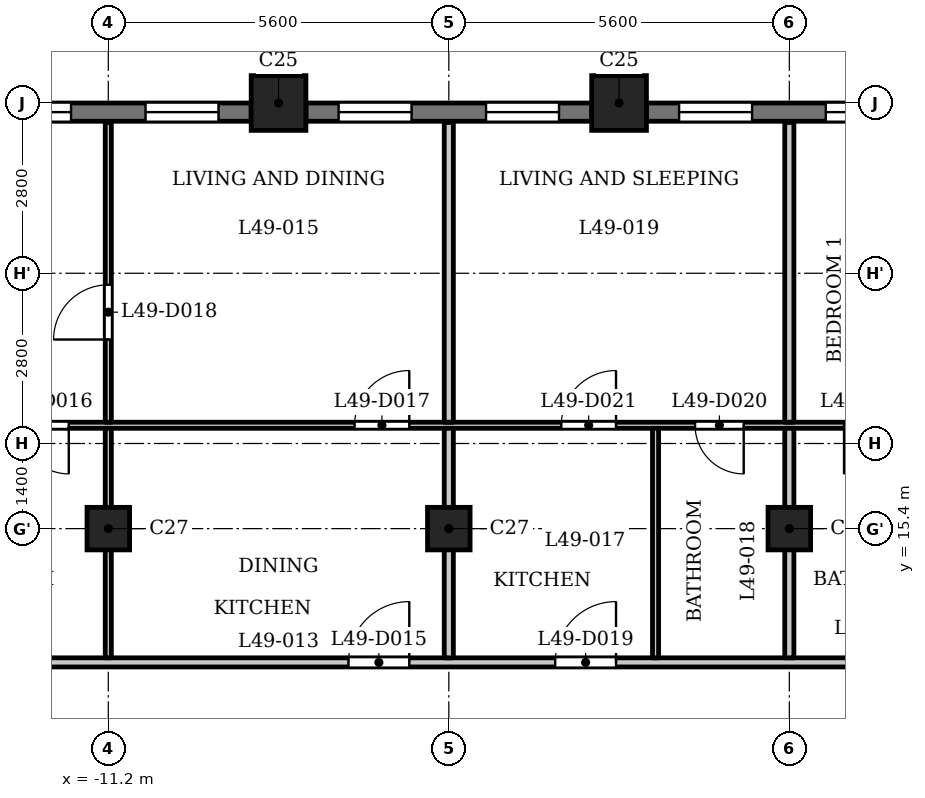
"""IFC4 building model, lengths in metres.
Left out: names, types, materials, properties, quantities, classifications, styles, units other than length and angle.
Written with IfcOpenShell. Run it as: python <this file> out.ifc"""

import sys

from ifc_helpers import new_model, si_unit, direction, frame, frame_2d, origin, origin_2d, place, context, subcontext, project, spatial, rectangle, extrude, element, fill, save


model = new_model("IFC4")
c1 = context("Model", 3, precision=1e-05, world=origin(), true_north=direction((0.0, 1.0)))
c2 = subcontext(c1, "Body", "Model", "MODEL_VIEW")
j1 = project(units=[si_unit("LENGTHUNIT", "METRE"), si_unit("PLANEANGLEUNIT", "RADIAN")], contexts=[c1])
p1 = place(None, origin())
s1 = spatial("IfcSite", under=j1, at=p1, CompositionType="ELEMENT")
p2 = place(p1, origin())
s2 = spatial("IfcBuilding", under=s1, at=p2, CompositionType="ELEMENT")
p3 = place(p2, frame((0.0, 0.0, 192.4)))
s3 = spatial("IfcBuildingStorey", under=s2, at=p3, CompositionType="ELEMENT", Elevation=192.4)
for number, where, z_axis, x_axis in (
    (1, (-2.8, 22.4, 0.0), (0.0, 0.0, 1.0), (1.0, 0.0, 0.0)),
    (2, (-8.4, 22.4, 0.0), (0.0, 0.0, 1.0), (1.0, 0.0, 0.0)),
):
    element("IfcColumn", number, at=place(p3, frame(where, z_axis=z_axis, x_axis=x_axis)), inside=s3, PredefinedType="COLUMN", context=c2, shape_type="SweptSolid", body=[
        extrude(rectangle(XDim=0.9, YDim=0.9, at=origin_2d()), origin(), (0.0, 0.0, 1.0), 3.5),
    ])
for number, where, z_axis, x_axis in (
    (3, (-11.2, 15.4, 0.0), (0.0, 0.0, 1.0), (1.0, 0.0, 0.0)),
    (4, (-5.6, 15.4, 0.0), (0.0, 0.0, 1.0), (1.0, 0.0, 0.0)),
    (5, (0.0, 15.4, 0.0), (0.0, 0.0, 1.0), (1.0, 0.0, 0.0)),
):
    element("IfcColumn", number, at=place(p3, frame(where, z_axis=z_axis, x_axis=x_axis)), inside=s3, PredefinedType="COLUMN", context=c2, shape_type="SweptSolid", body=[
        extrude(rectangle(XDim=0.7, YDim=0.7, at=origin_2d()), origin(), (0.0, 0.0, 1.0), 3.5),
    ])
p4 = place(p3, frame((2.35, 22.25, 0.0), z_axis=(0.0, 0.0, 1.0), x_axis=(-1.0, 0.0, 0.0)))
e6 = element("IfcWall", 6, at=p4, inside=s3, PredefinedType="SOLIDWALL", context=c2, shape_type="SweptSolid", body=[
    extrude(rectangle(XDim=4.7, YDim=0.3, at=frame_2d((2.35, 0.0))), origin(), (0.0, 0.0, 1.0), 2.5),
])
p5 = place(p4, frame((0.55, 0.0, 0.6)))
e7 = element("IfcOpeningElement", 7, at=p5, cuts=e6, PredefinedType="OPENING", context=c2, shape_type="SweptSolid", body=[
    extrude(rectangle(XDim=1.2, YDim=1.55, at=frame_2d((0.6, 0.775))), frame((0.0, 0.16, 0.0), z_axis=(0.0, -1.0, 0.0), x_axis=(1.0, 0.0, 0.0)), (0.0, 0.0, 1.0), 0.32),
])
p6 = place(p4, frame((2.962, 0.0, 0.6)))
e8 = element("IfcOpeningElement", 8, at=p6, cuts=e6, PredefinedType="OPENING", context=c2, shape_type="SweptSolid", body=[
    extrude(rectangle(XDim=1.2, YDim=1.55, at=frame_2d((0.6, 0.775))), frame((0.0, 0.16, 0.0), z_axis=(0.0, -1.0, 0.0), x_axis=(1.0, 0.0, 0.0)), (0.0, 0.0, 1.0), 0.32),
])
p7 = place(p3, frame((-3.25, 22.25, 0.0), z_axis=(0.0, 0.0, 1.0), x_axis=(-1.0, 0.0, 0.0)))
e9 = element("IfcWall", 9, at=p7, inside=s3, PredefinedType="SOLIDWALL", context=c2, shape_type="SweptSolid", body=[
    extrude(rectangle(XDim=4.7, YDim=0.3, at=frame_2d((2.35, 0.0))), origin(), (0.0, 0.0, 1.0), 2.5),
])
p8 = place(p7, frame((0.538, 0.0, 0.6)))
e10 = element("IfcOpeningElement", 10, at=p8, cuts=e9, PredefinedType="OPENING", context=c2, shape_type="SweptSolid", body=[
    extrude(rectangle(XDim=1.2, YDim=1.55, at=frame_2d((0.6, 0.775))), frame((0.0, 0.16, 0.0), z_axis=(0.0, -1.0, 0.0), x_axis=(1.0, 0.0, 0.0)), (0.0, 0.0, 1.0), 0.32),
])
p9 = place(p7, frame((2.962, 0.0, 0.6)))
e11 = element("IfcOpeningElement", 11, at=p9, cuts=e9, PredefinedType="OPENING", context=c2, shape_type="SweptSolid", body=[
    extrude(rectangle(XDim=1.2, YDim=1.55, at=frame_2d((0.6, 0.775))), frame((0.0, 0.16, 0.0), z_axis=(0.0, -1.0, 0.0), x_axis=(1.0, 0.0, 0.0)), (0.0, 0.0, 1.0), 0.32),
])
p10 = place(p3, frame((-8.85, 22.25, 0.0), z_axis=(0.0, 0.0, 1.0), x_axis=(-1.0, 0.0, 0.0)))
e12 = element("IfcWall", 12, at=p10, inside=s3, PredefinedType="SOLIDWALL", context=c2, shape_type="SweptSolid", body=[
    extrude(rectangle(XDim=4.7, YDim=0.3, at=frame_2d((2.35, 0.0))), origin(), (0.0, 0.0, 1.0), 2.5),
])
p11 = place(p10, frame((0.538, 0.0, 0.6)))
e13 = element("IfcOpeningElement", 13, at=p11, cuts=e12, PredefinedType="OPENING", context=c2, shape_type="SweptSolid", body=[
    extrude(rectangle(XDim=1.2, YDim=1.55, at=frame_2d((0.6, 0.775))), frame((0.0, 0.16, 0.0), z_axis=(0.0, -1.0, 0.0), x_axis=(1.0, 0.0, 0.0)), (0.0, 0.0, 1.0), 0.32),
])
p12 = place(p10, frame((2.962, 0.0, 0.6)))
e14 = element("IfcOpeningElement", 14, at=p12, cuts=e12, PredefinedType="OPENING", context=c2, shape_type="SweptSolid", body=[
    extrude(rectangle(XDim=1.2, YDim=1.55, at=frame_2d((0.6, 0.775))), frame((0.0, 0.16, 0.0), z_axis=(0.0, -1.0, 0.0), x_axis=(1.0, 0.0, 0.0)), (0.0, 0.0, 1.0), 0.32),
])
p13 = place(p3, frame((-17.4, 13.2, 0.0), z_axis=(0.0, 0.0, 1.0), x_axis=(1.0, 0.0, 0.0)))
e15 = element("IfcWall", 15, at=p13, inside=s3, PredefinedType="PARTITIONING", context=c2, shape_type="SweptSolid", body=[
    extrude(rectangle(XDim=34.8, YDim=0.15, at=frame_2d((17.4, 0.0))), origin(), (0.0, 0.0, 1.0), 3.2),
])
p14 = place(p13, frame((0.25, 0.0, 0.0)))
e16 = element("IfcOpeningElement", 16, at=p14, cuts=e15, PredefinedType="OPENING", context=c2, shape_type="SweptSolid", body=[
    extrude(rectangle(XDim=1.0, YDim=2.1, at=frame_2d((0.5, 1.05))), frame((0.0, 0.085, 0.0), z_axis=(0.0, -1.0, 0.0), x_axis=(1.0, 0.0, 0.0)), (0.0, 0.0, 1.0), 0.17),
])
p15 = place(p13, frame((33.65, 0.0, 0.0)))
e17 = element("IfcOpeningElement", 17, at=p15, cuts=e15, PredefinedType="OPENING", context=c2, shape_type="SweptSolid", body=[
    extrude(rectangle(XDim=1.0, YDim=2.1, at=frame_2d((0.5, 1.05))), frame((0.0, 0.085, 0.0), z_axis=(0.0, -1.0, 0.0), x_axis=(1.0, 0.0, 0.0)), (0.0, 0.0, 1.0), 0.17),
])
p16 = place(p13, frame((10.15, 0.0, 0.0)))
e18 = element("IfcOpeningElement", 18, at=p16, cuts=e15, PredefinedType="OPENING", context=c2, shape_type="SweptSolid", body=[
    extrude(rectangle(XDim=1.0, YDim=2.1, at=frame_2d((0.5, 1.05))), frame((0.0, 0.085, 0.0), z_axis=(0.0, -1.0, 0.0), x_axis=(1.0, 0.0, 0.0)), (0.0, 0.0, 1.0), 0.17),
])
p17 = place(p13, frame((13.55, 0.0, 0.0)))
e19 = element("IfcOpeningElement", 19, at=p17, cuts=e15, PredefinedType="OPENING", context=c2, shape_type="SweptSolid", body=[
    extrude(rectangle(XDim=1.0, YDim=2.1, at=frame_2d((0.5, 1.05))), frame((0.0, 0.085, 0.0), z_axis=(0.0, -1.0, 0.0), x_axis=(1.0, 0.0, 0.0)), (0.0, 0.0, 1.0), 0.17),
])
p18 = place(p13, frame((20.85, 0.0, 0.0)))
e20 = element("IfcOpeningElement", 20, at=p18, cuts=e15, PredefinedType="OPENING", context=c2, shape_type="SweptSolid", body=[
    extrude(rectangle(XDim=1.0, YDim=2.1, at=frame_2d((0.5, 1.05))), frame((0.0, 0.085, 0.0), z_axis=(0.0, -1.0, 0.0), x_axis=(1.0, 0.0, 0.0)), (0.0, 0.0, 1.0), 0.17),
])
p19 = place(p13, frame((23.7, 0.0, 0.0)))
e21 = element("IfcOpeningElement", 21, at=p19, cuts=e15, PredefinedType="OPENING", context=c2, shape_type="SweptSolid", body=[
    extrude(rectangle(XDim=1.0, YDim=2.1, at=frame_2d((0.5, 1.05))), frame((0.0, 0.085, 0.0), z_axis=(0.0, -1.0, 0.0), x_axis=(1.0, 0.0, 0.0)), (0.0, 0.0, 1.0), 0.17),
])
p20 = place(p3, frame((-16.725, 17.1, 0.0), z_axis=(0.0, 0.0, 1.0), x_axis=(1.0, 0.0, 0.0)))
e22 = element("IfcWall", 22, at=p20, inside=s3, PredefinedType="PARTITIONING", context=c2, shape_type="SweptSolid", body=[
    extrude(rectangle(XDim=33.45, YDim=0.1, at=frame_2d((16.725, 0.0))), origin(), (0.0, 0.0, 1.0), 3.2),
])
p21 = place(p20, frame((4.075, 0.0, 0.0)))
e23 = element("IfcOpeningElement", 23, at=p21, cuts=e22, PredefinedType="OPENING", context=c2, shape_type="SweptSolid", body=[
    extrude(rectangle(XDim=0.8, YDim=2.1, at=frame_2d((0.4, 1.05))), frame((0.0, 0.06, 0.0), z_axis=(0.0, -1.0, 0.0), x_axis=(1.0, 0.0, 0.0)), (0.0, 0.0, 1.0), 0.12),
])
p22 = place(p20, frame((9.575, 0.0, 0.0)))
e24 = element("IfcOpeningElement", 24, at=p22, cuts=e22, PredefinedType="OPENING", context=c2, shape_type="SweptSolid", body=[
    extrude(rectangle(XDim=0.9, YDim=2.1, at=frame_2d((0.45, 1.05))), frame((0.0, 0.06, 0.0), z_axis=(0.0, -1.0, 0.0), x_axis=(1.0, 0.0, 0.0)), (0.0, 0.0, 1.0), 0.12),
])
p23 = place(p20, frame((15.175, 0.0, 0.0)))
e25 = element("IfcOpeningElement", 25, at=p23, cuts=e22, PredefinedType="OPENING", context=c2, shape_type="SweptSolid", body=[
    extrude(rectangle(XDim=0.8, YDim=2.1, at=frame_2d((0.4, 1.05))), frame((0.0, 0.06, 0.0), z_axis=(0.0, -1.0, 0.0), x_axis=(1.0, 0.0, 0.0)), (0.0, 0.0, 1.0), 0.12),
])
p24 = place(p20, frame((12.975, 0.0, 0.0)))
e26 = element("IfcOpeningElement", 26, at=p24, cuts=e22, PredefinedType="OPENING", context=c2, shape_type="SweptSolid", body=[
    extrude(rectangle(XDim=0.9, YDim=2.1, at=frame_2d((0.45, 1.05))), frame((0.0, 0.06, 0.0), z_axis=(0.0, -1.0, 0.0), x_axis=(1.0, 0.0, 0.0)), (0.0, 0.0, 1.0), 0.12),
])
p25 = place(p20, frame((17.625, 0.0, 0.0)))
e27 = element("IfcOpeningElement", 27, at=p25, cuts=e22, PredefinedType="OPENING", context=c2, shape_type="SweptSolid", body=[
    extrude(rectangle(XDim=0.8, YDim=2.1, at=frame_2d((0.4, 1.05))), frame((0.0, 0.06, 0.0), z_axis=(0.0, -1.0, 0.0), x_axis=(1.0, 0.0, 0.0)), (0.0, 0.0, 1.0), 0.12),
])
p26 = place(p20, frame((20.025, 0.0, 0.0)))
e28 = element("IfcOpeningElement", 28, at=p26, cuts=e22, PredefinedType="OPENING", context=c2, shape_type="SweptSolid", body=[
    extrude(rectangle(XDim=0.9, YDim=2.1, at=frame_2d((0.45, 1.05))), frame((0.0, 0.06, 0.0), z_axis=(0.0, -1.0, 0.0), x_axis=(1.0, 0.0, 0.0)), (0.0, 0.0, 1.0), 0.12),
])
p27 = place(p20, frame((31.975, 0.0, 0.0)))
e29 = element("IfcOpeningElement", 29, at=p27, cuts=e22, PredefinedType="OPENING", context=c2, shape_type="SweptSolid", body=[
    extrude(rectangle(XDim=0.8, YDim=2.1, at=frame_2d((0.4, 1.05))), frame((0.0, 0.06, 0.0), z_axis=(0.0, -1.0, 0.0), x_axis=(1.0, 0.0, 0.0)), (0.0, 0.0, 1.0), 0.12),
])
p28 = place(p20, frame((29.775, 0.0, 0.0)))
e30 = element("IfcOpeningElement", 30, at=p28, cuts=e22, PredefinedType="OPENING", context=c2, shape_type="SweptSolid", body=[
    extrude(rectangle(XDim=0.9, YDim=2.1, at=frame_2d((0.45, 1.05))), frame((0.0, 0.06, 0.0), z_axis=(0.0, -1.0, 0.0), x_axis=(1.0, 0.0, 0.0)), (0.0, 0.0, 1.0), 0.12),
])
p29 = place(p20, frame((23.025, 0.0, 0.0)))
e31 = element("IfcOpeningElement", 31, at=p29, cuts=e22, PredefinedType="OPENING", context=c2, shape_type="SweptSolid", body=[
    extrude(rectangle(XDim=0.9, YDim=2.1, at=frame_2d((0.45, 1.05))), frame((0.0, 0.06, 0.0), z_axis=(0.0, -1.0, 0.0), x_axis=(1.0, 0.0, 0.0)), (0.0, 0.0, 1.0), 0.12),
])
p30 = place(p20, frame((26.125, 0.0, 0.0)))
e32 = element("IfcOpeningElement", 32, at=p30, cuts=e22, PredefinedType="OPENING", context=c2, shape_type="SweptSolid", body=[
    extrude(rectangle(XDim=0.9, YDim=2.1, at=frame_2d((0.45, 1.05))), frame((0.0, 0.06, 0.0), z_axis=(0.0, -1.0, 0.0), x_axis=(1.0, 0.0, 0.0)), (0.0, 0.0, 1.0), 0.12),
])
p31 = place(p3, frame((-11.2, 13.275, 0.0), z_axis=(0.0, 0.0, 1.0), x_axis=(0.0, 1.0, 0.0)))
e33 = element("IfcWall", 33, at=p31, inside=s3, PredefinedType="PARTITIONING", context=c2, shape_type="SweptSolid", body=[
    extrude(rectangle(XDim=3.775, YDim=0.1, at=frame_2d((1.888, 0.0))), origin(), (0.0, 0.0, 1.0), 3.2),
])
p32 = place(p3, frame((-11.2, 17.15, 0.0), z_axis=(0.0, 0.0, 1.0), x_axis=(0.0, 1.0, 0.0)))
e34 = element("IfcWall", 34, at=p32, inside=s3, PredefinedType="PARTITIONING", context=c2, shape_type="SweptSolid", body=[
    extrude(rectangle(XDim=4.93, YDim=0.1, at=frame_2d((2.465, 0.0))), origin(), (0.0, 0.0, 1.0), 3.2),
])
p33 = place(p32, frame((1.36, 0.0, 0.0)))
e35 = element("IfcOpeningElement", 35, at=p33, cuts=e34, PredefinedType="OPENING", context=c2, shape_type="SweptSolid", body=[
    extrude(rectangle(XDim=0.9, YDim=2.1, at=frame_2d((0.45, 1.05))), frame((0.0, 0.06, 0.0), z_axis=(0.0, -1.0, 0.0), x_axis=(1.0, 0.0, 0.0)), (0.0, 0.0, 1.0), 0.12),
])
p34 = place(p3, frame((-5.6, 13.275, 0.0), z_axis=(0.0, 0.0, 1.0), x_axis=(0.0, 1.0, 0.0)))
e36 = element("IfcWall", 36, at=p34, inside=s3, PredefinedType="PARTITIONING", context=c2, shape_type="SweptSolid", body=[
    extrude(rectangle(XDim=3.775, YDim=0.15, at=frame_2d((1.888, 0.0))), origin(), (0.0, 0.0, 1.0), 3.2),
])
p35 = place(p3, frame((-5.6, 17.15, 0.0), z_axis=(0.0, 0.0, 1.0), x_axis=(0.0, 1.0, 0.0)))
e37 = element("IfcWall", 37, at=p35, inside=s3, PredefinedType="PARTITIONING", context=c2, shape_type="SweptSolid", body=[
    extrude(rectangle(XDim=4.93, YDim=0.15, at=frame_2d((2.465, 0.0))), origin(), (0.0, 0.0, 1.0), 3.2),
])
p36 = place(p3, frame((-2.2, 13.275, 0.0), z_axis=(0.0, 0.0, 1.0), x_axis=(0.0, 1.0, 0.0)))
e38 = element("IfcWall", 38, at=p36, inside=s3, PredefinedType="PARTITIONING", context=c2, shape_type="SweptSolid", body=[
    extrude(rectangle(XDim=3.775, YDim=0.1, at=frame_2d((1.888, 0.0))), origin(), (0.0, 0.0, 1.0), 3.2),
])
p37 = place(p3, frame((0.0, 13.275, 0.0), z_axis=(0.0, 0.0, 1.0), x_axis=(0.0, 1.0, 0.0)))
e39 = element("IfcWall", 39, at=p37, inside=s3, PredefinedType="PARTITIONING", context=c2, shape_type="SweptSolid", body=[
    extrude(rectangle(XDim=3.775, YDim=0.15, at=frame_2d((1.888, 0.0))), origin(), (0.0, 0.0, 1.0), 3.2),
])
p38 = place(p3, frame((0.0, 17.15, 0.0), z_axis=(0.0, 0.0, 1.0), x_axis=(0.0, 1.0, 0.0)))
e40 = element("IfcWall", 40, at=p38, inside=s3, PredefinedType="PARTITIONING", context=c2, shape_type="SweptSolid", body=[
    extrude(rectangle(XDim=4.93, YDim=0.15, at=frame_2d((2.465, 0.0))), origin(), (0.0, 0.0, 1.0), 3.2),
])
p39 = place(p16, origin())
e41 = element("IfcDoor", 41, at=p39, inside=s3, OperationType="SINGLE_SWING_LEFT", PredefinedType="DOOR", context=c2, shape_type="SweptSolid", body=[
    extrude(rectangle(XDim=1.0, YDim=2.1, at=frame_2d((0.5, 1.05))), frame((0.0, 0.025, 0.0), z_axis=(0.0, -1.0, 0.0), x_axis=(1.0, 0.0, 0.0)), (0.0, 0.0, 1.0), 0.05),
])
fill(e18, e41)
p40 = place(p21, origin())
e42 = element("IfcDoor", 42, at=p40, inside=s3, OperationType="SINGLE_SWING_RIGHT", PredefinedType="DOOR", context=c2, shape_type="SweptSolid", body=[
    extrude(rectangle(XDim=0.8, YDim=2.1, at=frame_2d((0.4, 1.05))), frame((0.0, 0.025, 0.0), z_axis=(0.0, -1.0, 0.0), x_axis=(1.0, 0.0, 0.0)), (0.0, 0.0, 1.0), 0.05),
])
fill(e23, e42)
p41 = place(p22, origin())
e43 = element("IfcDoor", 43, at=p41, inside=s3, OperationType="SINGLE_SWING_LEFT", PredefinedType="DOOR", context=c2, shape_type="SweptSolid", body=[
    extrude(rectangle(XDim=0.9, YDim=2.1, at=frame_2d((0.45, 1.05))), frame((0.0, 0.025, 0.0), z_axis=(0.0, -1.0, 0.0), x_axis=(1.0, 0.0, 0.0)), (0.0, 0.0, 1.0), 0.05),
])
fill(e24, e43)
p42 = place(p33, origin())
e44 = element("IfcDoor", 44, at=p42, inside=s3, OperationType="SINGLE_SWING_RIGHT", PredefinedType="DOOR", context=c2, shape_type="SweptSolid", body=[
    extrude(rectangle(XDim=0.9, YDim=2.1, at=frame_2d((0.45, 1.05))), frame((0.0, 0.025, 0.0), z_axis=(0.0, -1.0, 0.0), x_axis=(1.0, 0.0, 0.0)), (0.0, 0.0, 1.0), 0.05),
])
fill(e35, e44)
p43 = place(p17, origin())
e45 = element("IfcDoor", 45, at=p43, inside=s3, OperationType="SINGLE_SWING_LEFT", PredefinedType="DOOR", context=c2, shape_type="SweptSolid", body=[
    extrude(rectangle(XDim=1.0, YDim=2.1, at=frame_2d((0.5, 1.05))), frame((0.0, 0.025, 0.0), z_axis=(0.0, -1.0, 0.0), x_axis=(1.0, 0.0, 0.0)), (0.0, 0.0, 1.0), 0.05),
])
fill(e19, e45)
p44 = place(p23, origin())
e46 = element("IfcDoor", 46, at=p44, inside=s3, OperationType="SINGLE_SWING_RIGHT", PredefinedType="DOOR", context=c2, shape_type="SweptSolid", body=[
    extrude(rectangle(XDim=0.8, YDim=2.1, at=frame_2d((0.4, 1.05))), frame((0.0, 0.025, 0.0), z_axis=(0.0, -1.0, 0.0), x_axis=(1.0, 0.0, 0.0)), (0.0, 0.0, 1.0), 0.05),
])
fill(e25, e46)
p45 = place(p24, origin())
e47 = element("IfcDoor", 47, at=p45, inside=s3, OperationType="SINGLE_SWING_LEFT", PredefinedType="DOOR", context=c2, shape_type="SweptSolid", body=[
    extrude(rectangle(XDim=0.9, YDim=2.1, at=frame_2d((0.45, 1.05))), frame((0.0, 0.025, 0.0), z_axis=(0.0, -1.0, 0.0), x_axis=(1.0, 0.0, 0.0)), (0.0, 0.0, 1.0), 0.05),
])
fill(e26, e47)
p46 = place(p25, origin())
e48 = element("IfcDoor", 48, at=p46, inside=s3, OperationType="SINGLE_SWING_LEFT", PredefinedType="DOOR", context=c2, shape_type="SweptSolid", body=[
    extrude(rectangle(XDim=0.8, YDim=2.1, at=frame_2d((0.4, 1.05))), frame((0.0, 0.025, 0.0), z_axis=(0.0, -1.0, 0.0), x_axis=(1.0, 0.0, 0.0)), (0.0, 0.0, 1.0), 0.05),
])
fill(e27, e48)
p47 = place(p5, origin())
e49 = element("IfcWindow", 49, at=p47, inside=s3, PartitioningType="SINGLE_PANEL", PredefinedType="WINDOW", context=c2, shape_type="SweptSolid", body=[
    extrude(rectangle(XDim=1.2, YDim=1.55, at=frame_2d((0.6, 0.775))), frame((0.0, 0.03, 0.0), z_axis=(0.0, -1.0, 0.0), x_axis=(1.0, 0.0, 0.0)), (0.0, 0.0, 1.0), 0.06),
])
fill(e7, e49)
p48 = place(p6, origin())
e50 = element("IfcWindow", 50, at=p48, inside=s3, PartitioningType="SINGLE_PANEL", PredefinedType="WINDOW", context=c2, shape_type="SweptSolid", body=[
    extrude(rectangle(XDim=1.2, YDim=1.55, at=frame_2d((0.6, 0.775))), frame((0.0, 0.03, 0.0), z_axis=(0.0, -1.0, 0.0), x_axis=(1.0, 0.0, 0.0)), (0.0, 0.0, 1.0), 0.06),
])
fill(e8, e50)
p49 = place(p8, origin())
e51 = element("IfcWindow", 51, at=p49, inside=s3, PartitioningType="SINGLE_PANEL", PredefinedType="WINDOW", context=c2, shape_type="SweptSolid", body=[
    extrude(rectangle(XDim=1.2, YDim=1.55, at=frame_2d((0.6, 0.775))), frame((0.0, 0.03, 0.0), z_axis=(0.0, -1.0, 0.0), x_axis=(1.0, 0.0, 0.0)), (0.0, 0.0, 1.0), 0.06),
])
fill(e10, e51)
p50 = place(p9, origin())
e52 = element("IfcWindow", 52, at=p50, inside=s3, PartitioningType="SINGLE_PANEL", PredefinedType="WINDOW", context=c2, shape_type="SweptSolid", body=[
    extrude(rectangle(XDim=1.2, YDim=1.55, at=frame_2d((0.6, 0.775))), frame((0.0, 0.03, 0.0), z_axis=(0.0, -1.0, 0.0), x_axis=(1.0, 0.0, 0.0)), (0.0, 0.0, 1.0), 0.06),
])
fill(e11, e52)
p51 = place(p11, origin())
e53 = element("IfcWindow", 53, at=p51, inside=s3, PartitioningType="SINGLE_PANEL", PredefinedType="WINDOW", context=c2, shape_type="SweptSolid", body=[
    extrude(rectangle(XDim=1.2, YDim=1.55, at=frame_2d((0.6, 0.775))), frame((0.0, 0.03, 0.0), z_axis=(0.0, -1.0, 0.0), x_axis=(1.0, 0.0, 0.0)), (0.0, 0.0, 1.0), 0.06),
])
fill(e13, e53)
p52 = place(p12, origin())
e54 = element("IfcWindow", 54, at=p52, inside=s3, PartitioningType="SINGLE_PANEL", PredefinedType="WINDOW", context=c2, shape_type="SweptSolid", body=[
    extrude(rectangle(XDim=1.2, YDim=1.55, at=frame_2d((0.6, 0.775))), frame((0.0, 0.03, 0.0), z_axis=(0.0, -1.0, 0.0), x_axis=(1.0, 0.0, 0.0)), (0.0, 0.0, 1.0), 0.06),
])
fill(e14, e54)
save(model, sys.argv[1])
